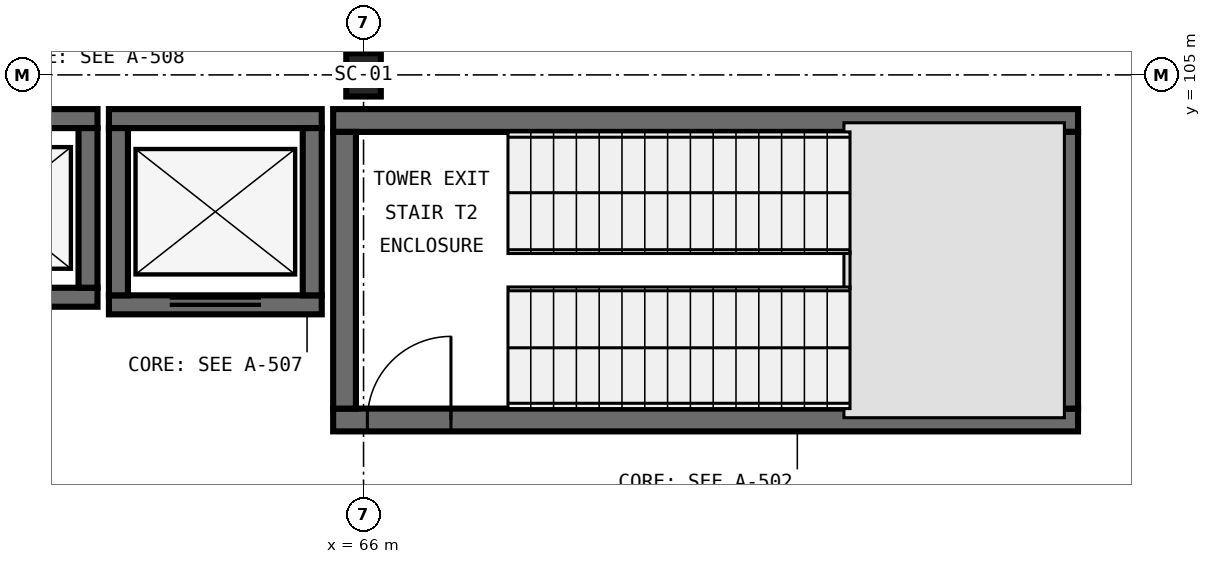
"""IFC4 building model, lengths in metres.
Left out: names, types, materials, properties, quantities, classifications, styles, units other than length and angle.
Written with IfcOpenShell. Run it as: python <this file> out.ifc"""

import sys

from ifc_helpers import new_model, si_unit, direction, frame, frame_2d, origin, origin_2d, place, context, subcontext, project, spatial, rectangle, i_section, extrude, element, fill, save


model = new_model("IFC4")
c1 = context("Model", 3, precision=1e-05, world=origin(), true_north=direction((0.0, 1.0)))
c2 = subcontext(c1, "Body", "Model", "MODEL_VIEW")
j1 = project(units=[si_unit("LENGTHUNIT", "METRE"), si_unit("PLANEANGLEUNIT", "RADIAN")], contexts=[c1])
p1 = place(None, origin())
s1 = spatial("IfcSite", under=j1, at=p1, CompositionType="ELEMENT")
p2 = place(p1, origin())
s2 = spatial("IfcBuilding", under=s1, at=p2, CompositionType="ELEMENT")
p3 = place(p2, frame((0.0, 0.0, -5.4)))
s3 = spatial("IfcBuildingStorey", under=s2, at=p3, CompositionType="ELEMENT", Elevation=-5.4)
p4 = place(p3, frame((66.0, 105.0, 0.0), z_axis=(0.0, 0.0, 1.0), x_axis=(1.0, 0.0, 0.0)))
e1 = element("IfcColumn", 1, at=p4, inside=s3, PredefinedType="COLUMN", context=c2, shape_type="SweptSolid", body=[
    extrude(i_section(OverallWidth=0.454, OverallDepth=0.569, WebThickness=0.078, FlangeThickness=0.125, FilletRadius=0.031, at=origin_2d()), origin(), (0.0, 0.0, 1.0), 5.4),
])
p5 = place(p3, frame((65.6, 100.46, 0.0), z_axis=(0.0, 0.0, 1.0), x_axis=(1.0, 0.0, 0.0)))
e2 = element("IfcWall", 2, at=p5, inside=s3, PredefinedType="SHEAR", context=c2, shape_type="SweptSolid", body=[
    extrude(rectangle(XDim=9.8, YDim=0.3, at=frame_2d((4.9, 0.0))), origin(), (0.0, 0.0, 1.0), 5.4),
])
p6 = place(p5, frame((0.45, 0.0, 0.0)))
e3 = element("IfcOpeningElement", 3, at=p6, cuts=e2, PredefinedType="OPENING", context=c2, shape_type="SweptSolid", body=[
    extrude(rectangle(XDim=1.1, YDim=2.2, at=frame_2d((0.55, 1.1))), frame((0.0, 0.165, 0.0), z_axis=(0.0, -1.0, 0.0), x_axis=(1.0, 0.0, 0.0)), (0.0, 0.0, 1.0), 0.33),
])
p7 = place(p3, frame((75.4, 104.4, 0.0), z_axis=(0.0, 0.0, 1.0), x_axis=(-1.0, 0.0, 0.0)))
e4 = element("IfcWall", 4, at=p7, inside=s3, PredefinedType="SHEAR", context=c2, shape_type="SweptSolid", body=[
    extrude(rectangle(XDim=9.8, YDim=0.3, at=frame_2d((4.9, 0.0))), origin(), (0.0, 0.0, 1.0), 5.4),
])
for number, where, z_axis, x_axis in (
    (5, (65.75, 104.25, 0.0), (0.0, 0.0, 1.0), (0.0, -1.0, 0.0)),
    (6, (75.25, 100.61, 0.0), (0.0, 0.0, 1.0), (0.0, 1.0, 0.0)),
):
    element("IfcWall", number, at=place(p3, frame(where, z_axis=z_axis, x_axis=x_axis)), inside=s3, PredefinedType="SHEAR", context=c2, shape_type="SweptSolid", body=[
        extrude(rectangle(XDim=3.64, YDim=0.3, at=frame_2d((1.82, 0.0))), origin(), (0.0, 0.0, 1.0), 5.4),
    ])
p8 = place(p3, frame((62.65, 101.975, 0.0), z_axis=(0.0, 0.0, 1.0), x_axis=(1.0, 0.0, 0.0)))
e7 = element("IfcWall", 7, at=p8, inside=s3, PredefinedType="SHEAR", context=c2, shape_type="SweptSolid", body=[
    extrude(rectangle(XDim=2.8, YDim=0.25, at=frame_2d((1.4, 0.0))), origin(), (0.0, 0.0, 1.0), 5.4),
])
p9 = place(p8, frame((0.8, 0.0, 0.0)))
e8 = element("IfcOpeningElement", 8, at=p9, cuts=e7, PredefinedType="OPENING", context=c2, shape_type="SweptSolid", body=[
    extrude(rectangle(XDim=1.2, YDim=2.2, at=frame_2d((0.6, 1.1))), frame((0.0, 0.14, 0.0), z_axis=(0.0, -1.0, 0.0), x_axis=(1.0, 0.0, 0.0)), (0.0, 0.0, 1.0), 0.28),
])
p10 = place(p3, frame((65.45, 104.425, 0.0), z_axis=(0.0, 0.0, 1.0), x_axis=(-1.0, 0.0, 0.0)))
e9 = element("IfcWall", 9, at=p10, inside=s3, PredefinedType="SHEAR", context=c2, shape_type="SweptSolid", body=[
    extrude(rectangle(XDim=2.8, YDim=0.25, at=frame_2d((1.4, 0.0))), origin(), (0.0, 0.0, 1.0), 5.4),
])
for number, where, z_axis, x_axis in (
    (10, (62.775, 104.3, 0.0), (0.0, 0.0, 1.0), (0.0, -1.0, 0.0)),
    (11, (65.325, 102.1, 0.0), (0.0, 0.0, 1.0), (0.0, 1.0, 0.0)),
):
    element("IfcWall", number, at=place(p3, frame(where, z_axis=z_axis, x_axis=x_axis)), inside=s3, PredefinedType="SHEAR", context=c2, shape_type="SweptSolid", body=[
        extrude(rectangle(XDim=2.2, YDim=0.25, at=frame_2d((1.1, 0.0))), origin(), (0.0, 0.0, 1.0), 5.4),
    ])
p11 = place(p3, frame((59.8, 102.075, 0.0), z_axis=(0.0, 0.0, 1.0), x_axis=(1.0, 0.0, 0.0)))
e12 = element("IfcWall", 12, at=p11, inside=s3, PredefinedType="SHEAR", context=c2, shape_type="SweptSolid", body=[
    extrude(rectangle(XDim=2.7, YDim=0.25, at=frame_2d((1.35, 0.0))), origin(), (0.0, 0.0, 1.0), 5.4),
])
p12 = place(p11, frame((0.8, 0.0, 0.0)))
e13 = element("IfcOpeningElement", 13, at=p12, cuts=e12, PredefinedType="OPENING", context=c2, shape_type="SweptSolid", body=[
    extrude(rectangle(XDim=1.1, YDim=2.2, at=frame_2d((0.55, 1.1))), frame((0.0, 0.14, 0.0), z_axis=(0.0, -1.0, 0.0), x_axis=(1.0, 0.0, 0.0)), (0.0, 0.0, 1.0), 0.28),
])
p13 = place(p3, frame((62.5, 104.425, 0.0), z_axis=(0.0, 0.0, 1.0), x_axis=(-1.0, 0.0, 0.0)))
e14 = element("IfcWall", 14, at=p13, inside=s3, PredefinedType="SHEAR", context=c2, shape_type="SweptSolid", body=[
    extrude(rectangle(XDim=2.7, YDim=0.25, at=frame_2d((1.35, 0.0))), origin(), (0.0, 0.0, 1.0), 5.4),
])
p14 = place(p3, frame((62.375, 102.2, 0.0), z_axis=(0.0, 0.0, 1.0), x_axis=(0.0, 1.0, 0.0)))
e15 = element("IfcWall", 15, at=p14, inside=s3, PredefinedType="SHEAR", context=c2, shape_type="SweptSolid", body=[
    extrude(rectangle(XDim=2.1, YDim=0.25, at=frame_2d((1.05, 0.0))), origin(), (0.0, 0.0, 1.0), 5.4),
])
p15 = place(p6, origin())
e16 = element("IfcDoor", 16, at=p15, inside=s3, OperationType="SINGLE_SWING_RIGHT", PredefinedType="DOOR", context=c2, shape_type="SweptSolid", body=[
    extrude(rectangle(XDim=1.1, YDim=2.2, at=frame_2d((0.55, 1.1))), frame((0.0, 0.025, 0.0), z_axis=(0.0, -1.0, 0.0), x_axis=(1.0, 0.0, 0.0)), (0.0, 0.0, 1.0), 0.05),
])
fill(e3, e16)
p16 = place(p9, origin())
e17 = element("IfcDoor", 17, at=p16, inside=s3, OperationType="DOUBLE_DOOR_SLIDING", PredefinedType="DOOR", context=c2, shape_type="SweptSolid", body=[
    extrude(rectangle(XDim=1.2, YDim=2.2, at=frame_2d((0.6, 1.1))), frame((0.0, 0.025, 0.0), z_axis=(0.0, -1.0, 0.0), x_axis=(1.0, 0.0, 0.0)), (0.0, 0.0, 1.0), 0.05),
])
fill(e8, e17)
save(model, sys.argv[1])
